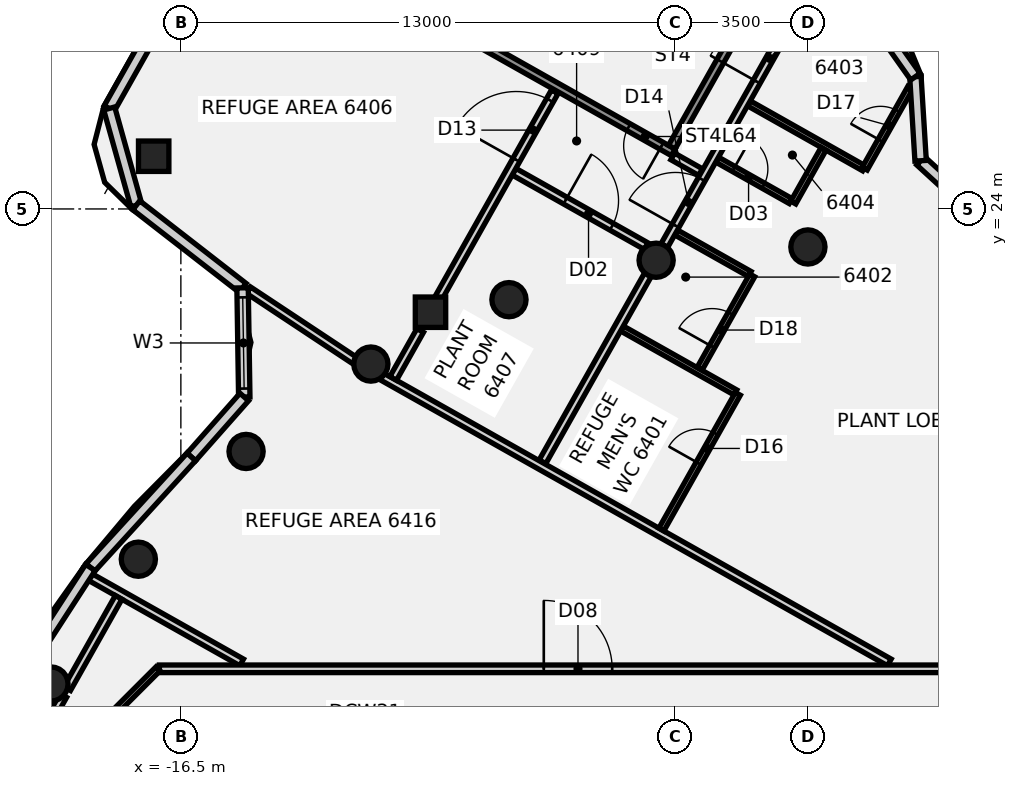
"""IFC4 building model, lengths in metres.
Left out: names, types, materials, properties, quantities, classifications, styles, units other than length and angle.
Written with IfcOpenShell. Run it as: python <this file> out.ifc"""

import sys

from ifc_helpers import new_model, si_unit, direction, frame, frame_2d, origin, origin_2d, place, context, subcontext, project, spatial, rectangle, circle, extrude, element, fill, save


model = new_model("IFC4")
c1 = context("Model", 3, precision=1e-05, world=origin(), true_north=direction((0.0, 1.0)))
c2 = subcontext(c1, "Body", "Model", "MODEL_VIEW")
j1 = project(units=[si_unit("LENGTHUNIT", "METRE"), si_unit("PLANEANGLEUNIT", "RADIAN")], contexts=[c1])
p1 = place(None, origin())
s1 = spatial("IfcSite", under=j1, at=p1, CompositionType="ELEMENT")
p2 = place(p1, origin())
s2 = spatial("IfcBuilding", under=s1, at=p2, CompositionType="ELEMENT")
p3 = place(p2, frame((0.0, 0.0, 252.3)))
s3 = spatial("IfcBuildingStorey", under=s2, at=p3, CompositionType="ELEMENT", Elevation=252.3)
for number, where, z_axis, x_axis in (
    (1, (0.0, 23.0, -0.18), (0.0, 0.0, 1.0), (1.0, 0.0, 0.0)),
    (2, (-3.994, 22.651, -0.18), (0.0, 0.0, 1.0), (1.0, 0.0, 0.0)),
    (3, (-7.866, 21.613, -0.18), (0.0, 0.0, 1.0), (1.0, 0.0, 0.0)),
    (4, (-11.5, 19.919, -0.18), (0.0, 0.0, 1.0), (1.0, 0.0, 0.0)),
    (5, (-14.784, 17.619, -0.18), (0.0, 0.0, 1.0), (1.0, 0.0, 0.0)),
    (6, (-17.619, 14.784, -0.18), (0.0, 0.0, 1.0), (1.0, 0.0, 0.0)),
    (7, (-19.919, 11.5, -0.18), (0.0, 0.0, 1.0), (1.0, 0.0, 0.0)),
):
    element("IfcColumn", number, at=place(p3, frame(where, z_axis=z_axis, x_axis=x_axis)), inside=s3, PredefinedType="COLUMN", context=c2, shape_type="SweptSolid", body=[
        extrude(circle(Radius=0.45, at=origin_2d()), origin(), (0.0, 0.0, 1.0), 4.54),
    ])
p4 = place(p3, frame((-9.931, 21.283, -0.176), z_axis=(0.003283481108, -0.039832393765, 0.999200980363), x_axis=(0.490053053062, 0.871063415319, 0.033113919684)))
e8 = element("IfcColumn", 8, at=p4, inside=s3, PredefinedType="COLUMN", context=c2, shape_type="SweptSolid", body=[
    extrude(rectangle(XDim=0.8, YDim=0.8, at=origin_2d()), origin(), (0.0, 0.0, 1.0), 4.536),
])
p5 = place(p3, frame((-17.215, 25.387, -0.174), z_axis=(0.083639441686, -0.120581527785, 0.989173664708), x_axis=(0.493570945418, 0.867347744338, 0.063996970486)))
e9 = element("IfcColumn", 9, at=p5, inside=s3, PredefinedType="COLUMN", context=c2, shape_type="SweptSolid", body=[
    extrude(rectangle(XDim=0.8, YDim=0.8, at=origin_2d()), origin(), (0.0, 0.0, 1.0), 4.58),
])
p6 = place(p3, frame((-19.131, 14.453, 0.0), z_axis=(0.0, 0.0, 1.0), x_axis=(0.871219461058, -0.490893726456, 0.0)))
e10 = element("IfcWall", 10, at=p6, inside=s3, PredefinedType="PARTITIONING", context=c2, shape_type="SweptSolid", body=[
    extrude(rectangle(XDim=4.855, YDim=0.2, at=frame_2d((2.428, 0.0))), origin(), (0.0, 0.0, 1.0), 3.66),
])
p7 = place(p3, frame((-14.725, 21.866, 0.0), z_axis=(0.0, 0.0, 1.0), x_axis=(0.833781800799, -0.552094112137, 0.0)))
e11 = element("IfcWall", 11, at=p7, inside=s3, PredefinedType="PARTITIONING", context=c2, shape_type="SweptSolid", body=[
    extrude(rectangle(XDim=3.549, YDim=0.2, at=frame_2d((1.774, 0.0))), origin(), (0.0, 0.0, 1.0), 3.66),
])
p8 = place(p3, frame((-11.373, 19.686, 0.0), z_axis=(0.0, 0.0, 1.0), x_axis=(0.871198713454, -0.490930546693, 0.0)))
e12 = element("IfcWall", 12, at=p8, inside=s3, PredefinedType="PARTITIONING", context=c2, shape_type="SweptSolid", body=[
    extrude(rectangle(XDim=15.514, YDim=0.2, at=frame_2d((7.757, 0.0))), origin(), (0.0, 0.0, 1.0), 3.66),
])
p9 = place(p3, frame((-7.733, 24.98, 0.0), z_axis=(0.0, 0.0, 1.0), x_axis=(0.871188339902, -0.490948955003, 0.0)))
e13 = element("IfcWall", 13, at=p9, inside=s3, PredefinedType="PARTITIONING", context=c2, shape_type="SweptSolid", body=[
    extrude(rectangle(XDim=3.994, YDim=0.2, at=frame_2d((1.997, 0.0))), origin(), (0.0, 0.0, 1.0), 3.66),
])
p10 = place(p9, frame((1.55, 0.0, 0.0)))
e14 = element("IfcOpeningElement", 14, at=p10, cuts=e13, PredefinedType="OPENING", context=c2, shape_type="SweptSolid", body=[
    extrude(rectangle(XDim=1.4, YDim=2.1, at=frame_2d((0.7, 1.05))), frame((0.0, 0.11, 0.0), z_axis=(0.0, -1.0, 0.0), x_axis=(1.0, 0.0, 0.0)), (0.0, 0.0, 1.0), 0.22),
])
p11 = place(p3, frame((-4.893, 20.854, 0.0), z_axis=(0.0, 0.0, 1.0), x_axis=(0.871287977001, -0.490772107127, 0.0)))
e15 = element("IfcWall", 15, at=p11, inside=s3, PredefinedType="PARTITIONING", context=c2, shape_type="SweptSolid", body=[
    extrude(rectangle(XDim=3.426, YDim=0.15, at=frame_2d((1.713, 0.0))), origin(), (0.0, 0.0, 1.0), 3.66),
])
p12 = place(p3, frame((-3.558, 25.382, 0.0), z_axis=(0.0, 0.0, 1.0), x_axis=(0.87131936668, -0.490716375566, 0.0)))
e16 = element("IfcWall", 16, at=p12, inside=s3, PredefinedType="PARTITIONING", context=c2, shape_type="SweptSolid", body=[
    extrude(rectangle(XDim=0.84, YDim=0.2, at=frame_2d((0.42, 0.0))), origin(), (0.0, 0.0, 1.0), 3.66),
])
p13 = place(p3, frame((-3.469, 23.381, 0.0), z_axis=(0.0, 0.0, 1.0), x_axis=(0.871285294393, -0.490776869641, 0.0)))
e17 = element("IfcWall", 17, at=p13, inside=s3, PredefinedType="PARTITIONING", context=c2, shape_type="SweptSolid", body=[
    extrude(rectangle(XDim=2.225, YDim=0.15, at=frame_2d((1.113, 0.0))), origin(), (0.0, 0.0, 1.0), 3.66),
])
p14 = place(p3, frame((-2.389, 25.298, 0.0), z_axis=(0.0, 0.0, 1.0), x_axis=(0.871090637824, -0.491122286906, 0.0)))
e18 = element("IfcWall", 18, at=p14, inside=s3, PredefinedType="PARTITIONING", context=c2, shape_type="SweptSolid", body=[
    extrude(rectangle(XDim=2.22, YDim=0.15, at=frame_2d((1.11, 0.0))), origin(), (0.0, 0.0, 1.0), 3.66),
])
p15 = place(p14, frame((0.5, 0.0, 0.0)))
e19 = element("IfcOpeningElement", 19, at=p15, cuts=e18, PredefinedType="OPENING", context=c2, shape_type="SweptSolid", body=[
    extrude(rectangle(XDim=0.9, YDim=2.1, at=frame_2d((0.45, 1.05))), frame((0.0, 0.085, 0.0), z_axis=(0.0, -1.0, 0.0), x_axis=(1.0, 0.0, 0.0)), (0.0, 0.0, 1.0), 0.17),
])
p16 = place(p3, frame((-1.554, 26.779, 0.0), z_axis=(0.0, 0.0, 1.0), x_axis=(0.870988474872, -0.491303446599, 0.0)))
e20 = element("IfcWall", 20, at=p16, inside=s3, PredefinedType="PARTITIONING", context=c2, shape_type="SweptSolid", body=[
    extrude(rectangle(XDim=3.48, YDim=0.15, at=frame_2d((1.74, 0.0))), origin(), (0.0, 0.0, 1.0), 3.66),
])
p17 = place(p3, frame((-17.065, 11.9, 0.0), z_axis=(0.0, 0.0, 1.0), x_axis=(1.0, 0.0, 0.0)))
e21 = element("IfcWall", 21, at=p17, inside=s3, PredefinedType="PARTITIONING", context=c2, shape_type="SweptSolid", body=[
    extrude(rectangle(XDim=34.165, YDim=0.2, at=frame_2d((17.083, 0.0))), origin(), (0.0, 0.0, 1.0), 3.66),
])
p18 = place(p17, frame((22.508, 0.0, 0.0)))
e22 = element("IfcOpeningElement", 22, at=p18, cuts=e21, PredefinedType="OPENING", context=c2, shape_type="SweptSolid", body=[
    extrude(rectangle(XDim=1.8, YDim=2.1, at=frame_2d((0.9, 1.05))), frame((0.0, 0.11, 0.0), z_axis=(0.0, -1.0, 0.0), x_axis=(1.0, 0.0, 0.0)), (0.0, 0.0, 1.0), 0.22),
])
p19 = place(p17, frame((10.115, 0.0, 0.0)))
e23 = element("IfcOpeningElement", 23, at=p19, cuts=e21, PredefinedType="OPENING", context=c2, shape_type="SweptSolid", body=[
    extrude(rectangle(XDim=1.8, YDim=2.1, at=frame_2d((0.9, 1.05))), frame((0.0, 0.11, 0.0), z_axis=(0.0, -1.0, 0.0), x_axis=(1.0, 0.0, 0.0)), (0.0, 0.0, 1.0), 0.22),
])
p20 = place(p3, frame((-18.865, 10.135, 0.0), z_axis=(0.0, 0.0, 1.0), x_axis=(0.707106781187, 0.707106781187, 0.0)))
e24 = element("IfcWall", 24, at=p20, inside=s3, PredefinedType="PARTITIONING", context=c2, shape_type="SweptSolid", body=[
    extrude(rectangle(XDim=2.495, YDim=0.15, at=frame_2d((1.248, 0.0))), origin(), (0.0, 0.0, 1.0), 3.66),
])
p21 = place(p3, frame((-21.295, 8.177, 0.0), z_axis=(0.0, 0.0, 1.0), x_axis=(0.490973223741, 0.871174663067, 0.0)))
e25 = element("IfcWall", 25, at=p21, inside=s3, PredefinedType="PARTITIONING", context=c2, shape_type="SweptSolid", body=[
    extrude(rectangle(XDim=3.467, YDim=0.2, at=frame_2d((1.733, 0.0))), origin(), (0.0, 0.0, 1.0), 3.66),
])
p22 = place(p3, frame((-19.491, 11.377, 0.0), z_axis=(0.0, 0.0, 1.0), x_axis=(0.490950733336, 0.871187337739, 0.0)))
e26 = element("IfcWall", 26, at=p22, inside=s3, PredefinedType="PARTITIONING", context=c2, shape_type="SweptSolid", body=[
    extrude(rectangle(XDim=2.756, YDim=0.2, at=frame_2d((1.378, 0.0))), origin(), (0.0, 0.0, 1.0), 3.66),
])
p23 = place(p3, frame((-10.913, 19.541, 0.0), z_axis=(0.0, 0.0, 1.0), x_axis=(0.490861767795, 0.871237467581, 0.0)))
e27 = element("IfcWall", 27, at=p23, inside=s3, PredefinedType="PARTITIONING", context=c2, shape_type="SweptSolid", body=[
    extrude(rectangle(XDim=1.447, YDim=0.2, at=frame_2d((0.724, 0.0))), origin(), (0.0, 0.0, 1.0), 3.66),
])
p24 = place(p3, frame((-9.735, 21.632, 0.0), z_axis=(0.0, 0.0, 1.0), x_axis=(0.490972161339, 0.87117526181, 0.0)))
e28 = element("IfcWall", 28, at=p24, inside=s3, PredefinedType="PARTITIONING", context=c2, shape_type="SweptSolid", body=[
    extrude(rectangle(XDim=6.26, YDim=0.2, at=frame_2d((3.13, 0.0))), origin(), (0.0, 0.0, 1.0), 3.66),
])
p25 = place(p24, frame((4.199, 0.0, 0.0)))
e29 = element("IfcOpeningElement", 29, at=p25, cuts=e28, PredefinedType="OPENING", context=c2, shape_type="SweptSolid", body=[
    extrude(rectangle(XDim=1.8, YDim=2.1, at=frame_2d((0.9, 1.05))), frame((0.0, 0.11, 0.0), z_axis=(0.0, -1.0, 0.0), x_axis=(1.0, 0.0, 0.0)), (0.0, 0.0, 1.0), 0.22),
])
p26 = place(p3, frame((-6.983, 17.348, 0.0), z_axis=(0.0, 0.0, 1.0), x_axis=(0.490949267778, 0.871188163641, 0.0)))
e30 = element("IfcWall", 30, at=p26, inside=s3, PredefinedType="PARTITIONING", context=c2, shape_type="SweptSolid", body=[
    extrude(rectangle(XDim=5.862, YDim=0.2, at=frame_2d((2.931, 0.0))), origin(), (0.0, 0.0, 1.0), 3.66),
])
p27 = place(p3, frame((-3.885, 22.847, 0.0), z_axis=(0.0, 0.0, 1.0), x_axis=(0.490960829695, 0.871181647939, 0.0)))
e31 = element("IfcWall", 31, at=p27, inside=s3, PredefinedType="PARTITIONING", context=c2, shape_type="SweptSolid", body=[
    extrude(rectangle(XDim=7.868, YDim=0.2, at=frame_2d((3.934, 0.0))), origin(), (0.0, 0.0, 1.0), 3.66),
])
p28 = place(p27, frame((0.819, 0.0, 0.0)))
e32 = element("IfcOpeningElement", 32, at=p28, cuts=e31, PredefinedType="OPENING", context=c2, shape_type="SweptSolid", body=[
    extrude(rectangle(XDim=1.4, YDim=2.1, at=frame_2d((0.7, 1.05))), frame((0.0, 0.11, 0.0), z_axis=(0.0, -1.0, 0.0), x_axis=(1.0, 0.0, 0.0)), (0.0, 0.0, 1.0), 0.22),
])
p29 = place(p27, frame((5.17, 0.0, 0.0)))
e33 = element("IfcOpeningElement", 33, at=p29, cuts=e31, PredefinedType="OPENING", context=c2, shape_type="SweptSolid", body=[
    extrude(rectangle(XDim=1.4, YDim=2.1, at=frame_2d((0.7, 1.05))), frame((0.0, 0.11, 0.0), z_axis=(0.0, -1.0, 0.0), x_axis=(1.0, 0.0, 0.0)), (0.0, 0.0, 1.0), 0.22),
])
p30 = place(p3, frame((-3.856, 15.564, 0.0), z_axis=(0.0, 0.0, 1.0), x_axis=(0.49096787186, 0.871177679237, 0.0)))
e34 = element("IfcWall", 34, at=p30, inside=s3, PredefinedType="PARTITIONING", context=c2, shape_type="SweptSolid", body=[
    extrude(rectangle(XDim=4.1, YDim=0.15, at=frame_2d((2.05, 0.0))), origin(), (0.0, 0.0, 1.0), 3.66),
])
p31 = place(p30, frame((2.0, 0.0, 0.0)))
e35 = element("IfcOpeningElement", 35, at=p31, cuts=e34, PredefinedType="OPENING", context=c2, shape_type="SweptSolid", body=[
    extrude(rectangle(XDim=0.9, YDim=2.1, at=frame_2d((0.45, 1.05))), frame((0.0, 0.085, 0.0), z_axis=(0.0, -1.0, 0.0), x_axis=(1.0, 0.0, 0.0)), (0.0, 0.0, 1.0), 0.17),
])
p32 = place(p3, frame((1.495, 25.06, 0.0), z_axis=(0.0, 0.0, 1.0), x_axis=(0.490981386235, 0.87117006283, 0.0)))
e36 = element("IfcWall", 36, at=p32, inside=s3, PredefinedType="PARTITIONING", context=c2, shape_type="SweptSolid", body=[
    extrude(rectangle(XDim=2.446, YDim=0.15, at=frame_2d((1.223, 0.0))), origin(), (0.0, 0.0, 1.0), 3.66),
])
p33 = place(p32, frame((0.85, 0.0, 0.0)))
e37 = element("IfcOpeningElement", 37, at=p33, cuts=e36, PredefinedType="OPENING", context=c2, shape_type="SweptSolid", body=[
    extrude(rectangle(XDim=0.9, YDim=2.1, at=frame_2d((0.45, 1.05))), frame((0.0, 0.085, 0.0), z_axis=(0.0, -1.0, 0.0), x_axis=(1.0, 0.0, 0.0)), (0.0, 0.0, 1.0), 0.17),
])
p34 = place(p3, frame((-2.85, 19.795, 0.0), z_axis=(0.0, 0.0, 1.0), x_axis=(0.490881675971, 0.871226250865, 0.0)))
e38 = element("IfcWall", 38, at=p34, inside=s3, PredefinedType="PARTITIONING", context=c2, shape_type="SweptSolid", body=[
    extrude(rectangle(XDim=2.821, YDim=0.15, at=frame_2d((1.41, 0.0))), origin(), (0.0, 0.0, 1.0), 3.66),
])
p35 = place(p34, frame((0.67, 0.0, 0.0)))
e39 = element("IfcOpeningElement", 39, at=p35, cuts=e38, PredefinedType="OPENING", context=c2, shape_type="SweptSolid", body=[
    extrude(rectangle(XDim=1.0, YDim=2.1, at=frame_2d((0.5, 1.05))), frame((0.0, 0.085, 0.0), z_axis=(0.0, -1.0, 0.0), x_axis=(1.0, 0.0, 0.0)), (0.0, 0.0, 1.0), 0.17),
])
p36 = place(p3, frame((-0.385, 24.168, 0.0), z_axis=(0.0, 0.0, 1.0), x_axis=(0.490967443079, 0.871177920884, 0.0)))
e40 = element("IfcWall", 40, at=p36, inside=s3, PredefinedType="PARTITIONING", context=c2, shape_type="SweptSolid", body=[
    extrude(rectangle(XDim=1.625, YDim=0.15, at=frame_2d((0.812, 0.0))), origin(), (0.0, 0.0, 1.0), 3.66),
])
p37 = place(p3, frame((5.107, 23.306, 0.0), z_axis=(0.0, 0.0, 1.0), x_axis=(-0.737248359807, 0.675621829104, 0.0)))
e41 = element("IfcWall", 41, at=p37, inside=s3, PredefinedType="SOLIDWALL", context=c2, shape_type="SweptSolid", body=[
    extrude(rectangle(XDim=2.904, YDim=0.3, at=frame_2d((1.452, 0.0))), origin(), (0.0, 0.0, 1.0), 4.36),
])
p38 = place(p3, frame((2.966, 25.268, 0.0), z_axis=(0.0, 0.0, 1.0), x_axis=(-0.061658520666, 0.998097303287, 0.0)))
e42 = element("IfcWall", 42, at=p38, inside=s3, PredefinedType="SOLIDWALL", context=c2, shape_type="SweptSolid", body=[
    extrude(rectangle(XDim=2.217, YDim=0.3, at=frame_2d((1.109, 0.0))), origin(), (0.0, 0.0, 1.0), 4.36),
])
p39 = place(p3, frame((2.829, 27.481, 0.0), z_axis=(0.0, 0.0, 1.0), x_axis=(-0.577459771893, 0.816419139808, 0.0)))
e43 = element("IfcWall", 43, at=p39, inside=s3, PredefinedType="SOLIDWALL", context=c2, shape_type="SweptSolid", body=[
    extrude(rectangle(XDim=1.604, YDim=0.3, at=frame_2d((0.802, 0.0))), origin(), (0.0, 0.0, 1.0), 4.36),
])
p40 = place(p3, frame((-13.495, 35.321, 0.0), z_axis=(0.0, 0.0, 1.0), x_axis=(-0.490922083825, -0.871203482324, 0.0)))
e44 = element("IfcWall", 44, at=p40, inside=s3, PredefinedType="SOLIDWALL", context=c2, shape_type="SweptSolid", body=[
    extrude(rectangle(XDim=9.961, YDim=0.3, at=frame_2d((4.98, 0.0))), origin(), (0.0, 0.0, 1.0), 4.36),
])
p41 = place(p40, frame((1.98, 0.0, 1.4)))
e45 = element("IfcOpeningElement", 45, at=p41, cuts=e44, PredefinedType="OPENING", context=c2, shape_type="SweptSolid", body=[
    extrude(rectangle(XDim=6.0, YDim=2.6, at=frame_2d((3.0, 1.3))), frame((0.0, 0.16, 0.0), z_axis=(0.0, -1.0, 0.0), x_axis=(1.0, 0.0, 0.0)), (0.0, 0.0, 1.0), 0.32),
])
p42 = place(p3, frame((-18.385, 26.644, 0.0), z_axis=(0.0, 0.0, 1.0), x_axis=(0.269047880209, -0.963126802739, 0.0)))
e46 = element("IfcWall", 46, at=p42, inside=s3, PredefinedType="SOLIDWALL", context=c2, shape_type="SweptSolid", body=[
    extrude(rectangle(XDim=2.645, YDim=0.3, at=frame_2d((1.323, 0.0))), origin(), (0.0, 0.0, 1.0), 4.36),
])
p43 = place(p3, frame((-17.673, 24.096, 0.0), z_axis=(0.0, 0.0, 1.0), x_axis=(0.789786309294, -0.613382087815, 0.0)))
e47 = element("IfcWall", 47, at=p43, inside=s3, PredefinedType="SOLIDWALL", context=c2, shape_type="SweptSolid", body=[
    extrude(rectangle(XDim=3.542, YDim=0.3, at=frame_2d((1.771, 0.0))), origin(), (0.0, 0.0, 1.0), 4.36),
])
p44 = place(p3, frame((-14.876, 21.924, 0.0), z_axis=(0.0, 0.0, 1.0), x_axis=(0.015552729789, -0.999879048983, 0.0)))
e48 = element("IfcWall", 48, at=p44, inside=s3, PredefinedType="SOLIDWALL", context=c2, shape_type="SweptSolid", body=[
    extrude(rectangle(XDim=2.873, YDim=0.3, at=frame_2d((1.436, 0.0))), origin(), (0.0, 0.0, 1.0), 4.36),
])
p45 = place(p44, frame((0.25, 0.0, 1.4)))
e49 = element("IfcOpeningElement", 49, at=p45, cuts=e48, PredefinedType="OPENING", context=c2, shape_type="SweptSolid", body=[
    extrude(rectangle(XDim=2.4, YDim=2.1, at=frame_2d((1.2, 1.05))), frame((0.0, 0.16, 0.0), z_axis=(0.0, -1.0, 0.0), x_axis=(1.0, 0.0, 0.0)), (0.0, 0.0, 1.0), 0.32),
])
p46 = place(p3, frame((-14.832, 19.051, 0.0), z_axis=(0.0, 0.0, 1.0), x_axis=(-0.662323524688, -0.749217958037, 0.0)))
e50 = element("IfcWall", 50, at=p46, inside=s3, PredefinedType="SOLIDWALL", context=c2, shape_type="SweptSolid", body=[
    extrude(rectangle(XDim=2.104, YDim=0.3, at=frame_2d((1.052, 0.0))), origin(), (0.0, 0.0, 1.0), 4.36),
])
p47 = place(p3, frame((-16.225, 17.475, 0.0), z_axis=(0.0, 0.0, 1.0), x_axis=(-0.674109155124, -0.738631739758, 0.0)))
e51 = element("IfcWall", 51, at=p47, inside=s3, PredefinedType="SOLIDWALL", context=c2, shape_type="SweptSolid", body=[
    extrude(rectangle(XDim=3.939, YDim=0.3, at=frame_2d((1.969, 0.0))), origin(), (0.0, 0.0, 1.0), 4.36),
])
p48 = place(p3, frame((-18.881, 14.565, 0.0), z_axis=(0.0, 0.0, 1.0), x_axis=(-0.54336180104, -0.839498632024, 0.0)))
e52 = element("IfcWall", 52, at=p48, inside=s3, PredefinedType="SOLIDWALL", context=c2, shape_type="SweptSolid", body=[
    extrude(rectangle(XDim=3.938, YDim=0.3, at=frame_2d((1.969, 0.0))), origin(), (0.0, 0.0, 1.0), 4.36),
])
p49 = place(p3, frame((-3.544, 25.489, -0.18), z_axis=(0.0, 0.0, 1.0), x_axis=(-0.871189898328, 0.490946189567, 0.0)))
e53 = element("IfcWall", 53, at=p49, inside=s3, PredefinedType="SHEAR", context=c2, shape_type="SweptSolid", body=[
    extrude(rectangle(XDim=6.7, YDim=0.2, at=frame_2d((3.35, 0.0))), origin(), (0.0, 0.0, 1.0), 3.944),
])
p50 = place(p49, frame((0.35, 0.0, 0.0)))
e54 = element("IfcOpeningElement", 54, at=p50, cuts=e53, PredefinedType="OPENING", context=c2, shape_type="SweptSolid", body=[
    extrude(rectangle(XDim=1.0, YDim=2.1, at=frame_2d((0.5, 1.05))), frame((0.0, 0.11, 0.0), z_axis=(0.0, -1.0, 0.0), x_axis=(1.0, 0.0, 0.0)), (0.0, 0.0, 1.0), 0.22),
])
p51 = place(p3, frame((-2.01, 28.413, -0.18), z_axis=(0.0, 0.0, 1.0), x_axis=(-0.490945688221, -0.871190180854, 0.0)))
e55 = element("IfcWall", 55, at=p51, inside=s3, PredefinedType="SHEAR", context=c2, shape_type="SweptSolid", body=[
    extrude(rectangle(XDim=3.2, YDim=0.2, at=frame_2d((1.6, 0.0))), origin(), (0.0, 0.0, 1.0), 4.54),
])
p52 = place(p10, frame((1.4, 0.0, 0.0), z_axis=(0.0, 0.0, 1.0), x_axis=(-1.0, 0.0, 0.0)))
e56 = element("IfcDoor", 56, at=p52, inside=s3, OperationType="DOUBLE_DOOR_SINGLE_SWING", PredefinedType="DOOR", context=c2, shape_type="SweptSolid", body=[
    extrude(rectangle(XDim=1.4, YDim=2.1, at=frame_2d((0.7, 1.05))), frame((0.0, 0.025, 0.0), z_axis=(0.0, -1.0, 0.0), x_axis=(1.0, 0.0, 0.0)), (0.0, 0.0, 1.0), 0.05),
])
fill(e14, e56)
p53 = place(p15, origin())
e57 = element("IfcDoor", 57, at=p53, inside=s3, OperationType="SINGLE_SWING_RIGHT", PredefinedType="DOOR", context=c2, shape_type="SweptSolid", body=[
    extrude(rectangle(XDim=0.9, YDim=2.1, at=frame_2d((0.45, 1.05))), frame((0.0, 0.025, 0.0), z_axis=(0.0, -1.0, 0.0), x_axis=(1.0, 0.0, 0.0)), (0.0, 0.0, 1.0), 0.05),
])
fill(e19, e57)
p54 = place(p19, origin())
e58 = element("IfcDoor", 58, at=p54, inside=s3, OperationType="DOUBLE_DOOR_SINGLE_SWING", PredefinedType="DOOR", context=c2, shape_type="SweptSolid", body=[
    extrude(rectangle(XDim=1.8, YDim=2.1, at=frame_2d((0.9, 1.05))), frame((0.0, 0.025, 0.0), z_axis=(0.0, -1.0, 0.0), x_axis=(1.0, 0.0, 0.0)), (0.0, 0.0, 1.0), 0.05),
])
fill(e23, e58)
p55 = place(p25, origin())
e59 = element("IfcDoor", 59, at=p55, inside=s3, OperationType="DOUBLE_DOOR_SINGLE_SWING", PredefinedType="DOOR", context=c2, shape_type="SweptSolid", body=[
    extrude(rectangle(XDim=1.8, YDim=2.1, at=frame_2d((0.9, 1.05))), frame((0.0, 0.025, 0.0), z_axis=(0.0, -1.0, 0.0), x_axis=(1.0, 0.0, 0.0)), (0.0, 0.0, 1.0), 0.05),
])
fill(e29, e59)
p56 = place(p28, frame((1.4, 0.0, 0.0), z_axis=(0.0, 0.0, 1.0), x_axis=(-1.0, 0.0, 0.0)))
e60 = element("IfcDoor", 60, at=p56, inside=s3, OperationType="DOUBLE_DOOR_SINGLE_SWING", PredefinedType="DOOR", context=c2, shape_type="SweptSolid", body=[
    extrude(rectangle(XDim=1.4, YDim=2.1, at=frame_2d((0.7, 1.05))), frame((0.0, 0.025, 0.0), z_axis=(0.0, -1.0, 0.0), x_axis=(1.0, 0.0, 0.0)), (0.0, 0.0, 1.0), 0.05),
])
fill(e32, e60)
p57 = place(p29, origin())
e61 = element("IfcDoor", 61, at=p57, inside=s3, OperationType="DOUBLE_DOOR_SINGLE_SWING", PredefinedType="DOOR", context=c2, shape_type="SweptSolid", body=[
    extrude(rectangle(XDim=1.4, YDim=2.1, at=frame_2d((0.7, 1.05))), frame((0.0, 0.025, 0.0), z_axis=(0.0, -1.0, 0.0), x_axis=(1.0, 0.0, 0.0)), (0.0, 0.0, 1.0), 0.05),
])
fill(e33, e61)
p58 = place(p31, origin())
e62 = element("IfcDoor", 62, at=p58, inside=s3, OperationType="SINGLE_SWING_LEFT", PredefinedType="DOOR", context=c2, shape_type="SweptSolid", body=[
    extrude(rectangle(XDim=0.9, YDim=2.1, at=frame_2d((0.45, 1.05))), frame((0.0, 0.025, 0.0), z_axis=(0.0, -1.0, 0.0), x_axis=(1.0, 0.0, 0.0)), (0.0, 0.0, 1.0), 0.05),
])
fill(e35, e62)
p59 = place(p33, origin())
e63 = element("IfcDoor", 63, at=p59, inside=s3, OperationType="SINGLE_SWING_LEFT", PredefinedType="DOOR", context=c2, shape_type="SweptSolid", body=[
    extrude(rectangle(XDim=0.9, YDim=2.1, at=frame_2d((0.45, 1.05))), frame((0.0, 0.025, 0.0), z_axis=(0.0, -1.0, 0.0), x_axis=(1.0, 0.0, 0.0)), (0.0, 0.0, 1.0), 0.05),
])
fill(e37, e63)
p60 = place(p35, origin())
e64 = element("IfcDoor", 64, at=p60, inside=s3, OperationType="SINGLE_SWING_RIGHT", PredefinedType="DOOR", context=c2, shape_type="SweptSolid", body=[
    extrude(rectangle(XDim=1.0, YDim=2.1, at=frame_2d((0.5, 1.05))), frame((0.0, 0.025, 0.0), z_axis=(0.0, -1.0, 0.0), x_axis=(1.0, 0.0, 0.0)), (0.0, 0.0, 1.0), 0.05),
])
fill(e39, e64)
p61 = place(p45, origin())
e65 = element("IfcWindow", 65, at=p61, inside=s3, PartitioningType="SINGLE_PANEL", PredefinedType="WINDOW", context=c2, shape_type="SweptSolid", body=[
    extrude(rectangle(XDim=2.4, YDim=2.1, at=frame_2d((1.2, 1.05))), frame((0.0, 0.03, 0.0), z_axis=(0.0, -1.0, 0.0), x_axis=(1.0, 0.0, 0.0)), (0.0, 0.0, 1.0), 0.06),
])
fill(e49, e65)
p62 = place(p50, origin())
e66 = element("IfcDoor", 66, at=p62, inside=s3, OperationType="SINGLE_SWING_LEFT", PredefinedType="DOOR", context=c2, shape_type="SweptSolid", body=[
    extrude(rectangle(XDim=1.0, YDim=2.1, at=frame_2d((0.5, 1.05))), frame((0.0, 0.025, 0.0), z_axis=(0.0, -1.0, 0.0), x_axis=(1.0, 0.0, 0.0)), (0.0, 0.0, 1.0), 0.05),
])
fill(e54, e66)
save(model, sys.argv[1])
